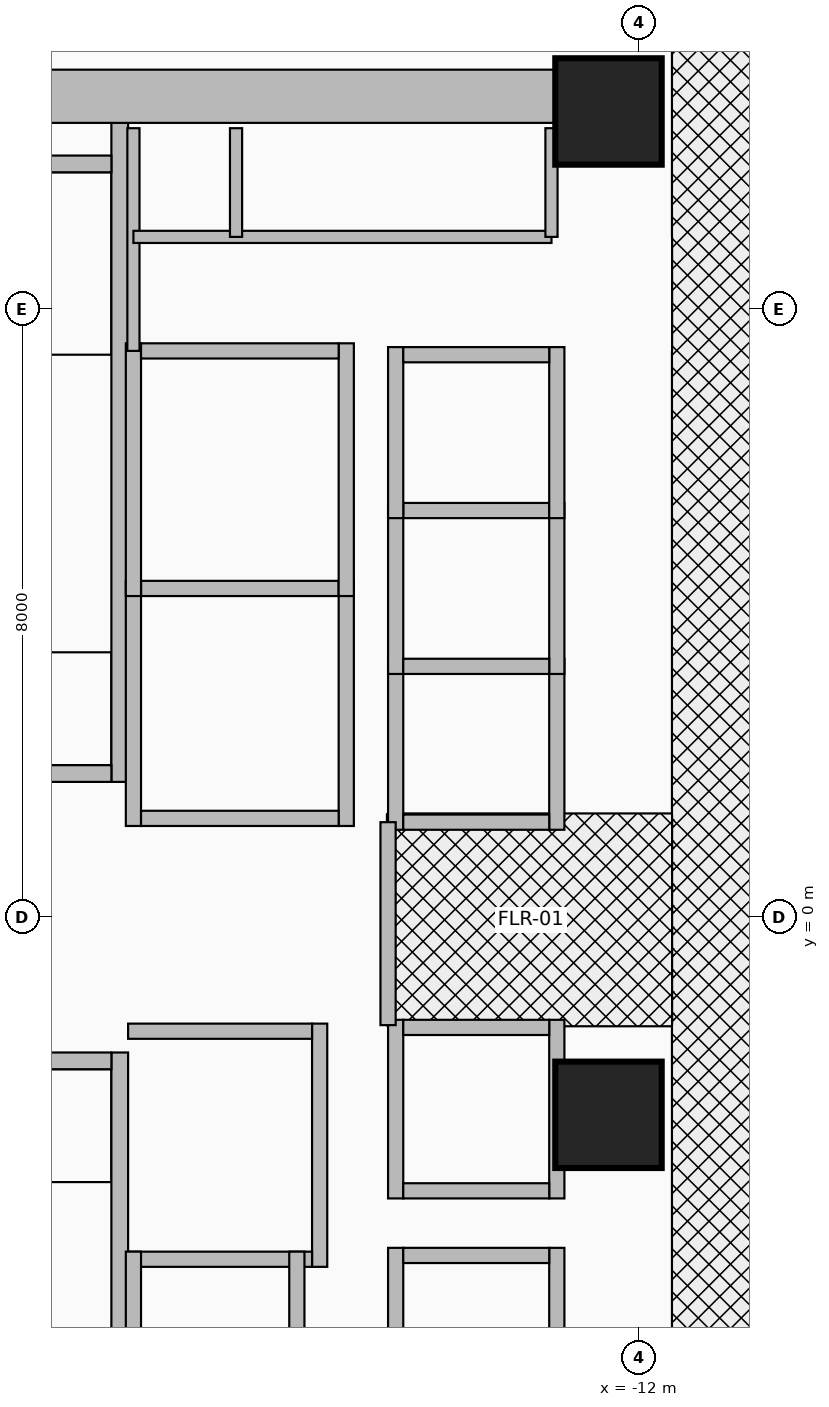
"""IFC4 building model, lengths in metres.
Left out: names, types, materials, properties, quantities, classifications, styles, units other than length and angle.
Written with IfcOpenShell. Run it as: python <this file> out.ifc"""

import sys

from ifc_helpers import new_model, si_unit, direction, frame, frame_2d, origin, origin_2d, place, context, subcontext, project, spatial, rectangle, extrude, source, transform, mapped, element, fill, save


model = new_model("IFC4")
c1 = context("Model", 3, precision=1e-05, world=origin(), true_north=direction((0.0, 1.0)))
c2 = subcontext(c1, "Body", "Model", "MODEL_VIEW")
j1 = project(units=[si_unit("LENGTHUNIT", "METRE"), si_unit("PLANEANGLEUNIT", "RADIAN")], contexts=[c1])
p1 = place(None, origin())
s1 = spatial("IfcSite", under=j1, at=p1, CompositionType="ELEMENT")
p2 = place(p1, origin())
s2 = spatial("IfcBuilding", under=s1, at=p2, CompositionType="ELEMENT")
p3 = place(p2, origin())
s3 = spatial("IfcBuildingStorey", under=s2, at=p3, CompositionType="ELEMENT", Elevation=0.0)
p4 = place(p3, frame((-18.83, 1.78, 0.0), z_axis=(0.0, 0.0, 1.0), x_axis=(0.0, 1.0, 0.0)))
e1 = element("IfcWall", 1, at=p4, inside=s3, PredefinedType="SHEAR", context=c2, shape_type="SweptSolid", body=[
    extrude(rectangle(XDim=8.67, YDim=0.22, at=frame_2d((4.335, 0.0))), origin(), (0.0, 0.0, 1.0), 4.92),
])
p5 = place(p3, frame((-22.05, 1.89, 0.0), z_axis=(0.0, 0.0, 1.0), x_axis=(1.0, 0.0, 0.0)))
e2 = element("IfcWall", 2, at=p5, inside=s3, PredefinedType="SHEAR", context=c2, shape_type="SweptSolid", body=[
    extrude(rectangle(XDim=3.11, YDim=0.22, at=frame_2d((1.555, 0.0))), origin(), (0.0, 0.0, 1.0), 4.92),
])
p6 = place(p5, frame((1.0, 0.0, 0.0)))
e3 = element("IfcOpeningElement", 3, at=p6, cuts=e2, PredefinedType="OPENING", context=c2, shape_type="SweptSolid", body=[
    extrude(rectangle(XDim=1.1, YDim=2.15, at=frame_2d((0.55, 1.075))), frame((0.0, 0.125, 0.0), z_axis=(0.0, -1.0, 0.0), x_axis=(1.0, 0.0, 0.0)), (0.0, 0.0, 1.0), 0.25),
])
p7 = place(p3, frame((-22.05, 9.91, 0.0), z_axis=(0.0, 0.0, 1.0), x_axis=(1.0, 0.0, 0.0)))
e4 = element("IfcWall", 4, at=p7, inside=s3, PredefinedType="SHEAR", context=c2, shape_type="SweptSolid", body=[
    extrude(rectangle(XDim=3.11, YDim=0.22, at=frame_2d((1.555, 0.0))), origin(), (0.0, 0.0, 1.0), 4.92),
])
p8 = place(p3, frame((-18.83, -10.45, 0.0), z_axis=(0.0, 0.0, 1.0), x_axis=(0.0, 1.0, 0.0)))
e5 = element("IfcWall", 5, at=p8, inside=s3, PredefinedType="SHEAR", context=c2, shape_type="SweptSolid", body=[
    extrude(rectangle(XDim=8.67, YDim=0.22, at=frame_2d((4.335, 0.0))), origin(), (0.0, 0.0, 1.0), 4.92),
])
p9 = place(p3, frame((-22.05, -1.89, 0.0), z_axis=(0.0, 0.0, 1.0), x_axis=(1.0, 0.0, 0.0)))
e6 = element("IfcWall", 6, at=p9, inside=s3, PredefinedType="SHEAR", context=c2, shape_type="SweptSolid", body=[
    extrude(rectangle(XDim=3.11, YDim=0.22, at=frame_2d((1.555, 0.0))), origin(), (0.0, 0.0, 1.0), 4.92),
])
p10 = place(p9, frame((1.0, 0.0, 0.0)))
e7 = element("IfcOpeningElement", 7, at=p10, cuts=e6, PredefinedType="OPENING", context=c2, shape_type="SweptSolid", body=[
    extrude(rectangle(XDim=1.1, YDim=2.15, at=frame_2d((0.55, 1.075))), frame((0.0, 0.125, 0.0), z_axis=(0.0, -1.0, 0.0), x_axis=(1.0, 0.0, 0.0)), (0.0, 0.0, 1.0), 0.25),
])
p11 = place(p3, frame((-22.65, 10.8, 0.0), z_axis=(0.0, 0.0, 1.0), x_axis=(1.0, 0.0, 0.0)))
e8 = element("IfcWall", 8, at=p11, inside=s3, PredefinedType="SHEAR", context=c2, shape_type="SweptSolid", body=[
    extrude(rectangle(XDim=10.25, YDim=0.7, at=frame_2d((5.125, 0.0))), origin(), (0.0, 0.0, 1.0), 4.92),
])
m1 = source(origin(), c2, "Body", "SweptSolid", [
    extrude(rectangle(XDim=1.4, YDim=1.4, at=origin_2d()), origin(), (0.0, 0.0, 1.0), 5.2),
])
for number, where, z_axis, x_axis in (
    (9, (-12.4, -2.6, 0.0), (0.0, 0.0, 1.0), (1.0, 0.0, 0.0)),
    (10, (-12.4, 10.6, 0.0), (0.0, 0.0, 1.0), (1.0, 0.0, 0.0)),
):
    element("IfcColumn", number, at=place(p3, frame(where, z_axis=z_axis, x_axis=x_axis)), inside=s3, PredefinedType="COLUMN", context=c2, shape_type="MappedRepresentation", body=[
        mapped(m1, transform((0.0, 0.0, 0.0), x_axis=(1.0, 0.0, 0.0), y_axis=(0.0, 1.0, 0.0), z_axis=(0.0, 0.0, 1.0), scale=1.0)),
    ])
for number, where, z_axis, x_axis in (
    (11, (-18.65, 1.2, 0.0), (0.0, 0.0, 1.0), (0.0, 1.0, 0.0)),
    (12, (-15.85, 1.2, 0.0), (0.0, 0.0, 1.0), (0.0, 1.0, 0.0)),
):
    element("IfcWall", number, at=place(p3, frame(where, z_axis=z_axis, x_axis=x_axis)), inside=s3, PredefinedType="MOVABLE", context=c2, shape_type="SweptSolid", body=[
        extrude(rectangle(XDim=3.225, YDim=0.2, at=frame_2d((1.613, 0.0))), origin(), (0.0, 0.0, 1.0), 4.92),
    ])
p12 = place(p3, frame((-18.55, 1.3, 0.0), z_axis=(0.0, 0.0, 1.0), x_axis=(1.0, 0.0, 0.0)))
e13 = element("IfcWall", 13, at=p12, inside=s3, PredefinedType="MOVABLE", context=c2, shape_type="SweptSolid", body=[
    extrude(rectangle(XDim=2.6, YDim=0.2, at=frame_2d((1.3, 0.0))), origin(), (0.0, 0.0, 1.0), 4.92),
])
p13 = place(p12, frame((0.7, 0.0, 0.0)))
e14 = element("IfcOpeningElement", 14, at=p13, cuts=e13, PredefinedType="OPENING", context=c2, shape_type="SweptSolid", body=[
    extrude(rectangle(XDim=1.2, YDim=2.1, at=frame_2d((0.6, 1.05))), frame((0.0, 0.115, 0.0), z_axis=(0.0, -1.0, 0.0), x_axis=(1.0, 0.0, 0.0)), (0.0, 0.0, 1.0), 0.23),
])
p14 = place(p3, frame((-18.55, 4.325, 0.0), z_axis=(0.0, 0.0, 1.0), x_axis=(1.0, 0.0, 0.0)))
e15 = element("IfcWall", 15, at=p14, inside=s3, PredefinedType="MOVABLE", context=c2, shape_type="SweptSolid", body=[
    extrude(rectangle(XDim=2.6, YDim=0.2, at=frame_2d((1.3, 0.0))), origin(), (0.0, 0.0, 1.0), 4.92),
])
p15 = place(p3, frame((-16.2, -4.6, 0.0), z_axis=(0.0, 0.0, 1.0), x_axis=(0.0, 1.0, 0.0)))
e16 = element("IfcWall", 16, at=p15, inside=s3, PredefinedType="MOVABLE", context=c2, shape_type="SweptSolid", body=[
    extrude(rectangle(XDim=3.2, YDim=0.2, at=frame_2d((1.6, 0.0))), origin(), (0.0, 0.0, 1.0), 4.92),
])
p16 = place(p3, frame((-18.72, -4.5, 0.0), z_axis=(0.0, 0.0, 1.0), x_axis=(1.0, 0.0, 0.0)))
e17 = element("IfcWall", 17, at=p16, inside=s3, PredefinedType="MOVABLE", context=c2, shape_type="SweptSolid", body=[
    extrude(rectangle(XDim=2.42, YDim=0.2, at=frame_2d((1.21, 0.0))), origin(), (0.0, 0.0, 1.0), 4.92),
])
p17 = place(p3, frame((-18.72, -1.5, 0.0), z_axis=(0.0, 0.0, 1.0), x_axis=(1.0, 0.0, 0.0)))
e18 = element("IfcWall", 18, at=p17, inside=s3, PredefinedType="MOVABLE", context=c2, shape_type="SweptSolid", body=[
    extrude(rectangle(XDim=2.42, YDim=0.2, at=frame_2d((1.21, 0.0))), origin(), (0.0, 0.0, 1.0), 4.92),
])
p18 = place(p17, frame((0.61, 0.0, 0.0)))
e19 = element("IfcOpeningElement", 19, at=p18, cuts=e18, PredefinedType="OPENING", context=c2, shape_type="SweptSolid", body=[
    extrude(rectangle(XDim=1.2, YDim=2.1, at=frame_2d((0.6, 1.05))), frame((0.0, 0.115, 0.0), z_axis=(0.0, -1.0, 0.0), x_axis=(1.0, 0.0, 0.0)), (0.0, 0.0, 1.0), 0.23),
])
for number, where, z_axis, x_axis in (
    (20, (-18.65, 4.225, 0.0), (0.0, 0.0, 1.0), (0.0, 1.0, 0.0)),
    (21, (-15.85, 4.225, 0.0), (0.0, 0.0, 1.0), (0.0, 1.0, 0.0)),
):
    element("IfcWall", number, at=place(p3, frame(where, z_axis=z_axis, x_axis=x_axis)), inside=s3, PredefinedType="MOVABLE", context=c2, shape_type="SweptSolid", body=[
        extrude(rectangle(XDim=3.325, YDim=0.2, at=frame_2d((1.663, 0.0))), origin(), (0.0, 0.0, 1.0), 4.92),
    ])
p19 = place(p3, frame((-18.55, 7.45, 0.0), z_axis=(0.0, 0.0, 1.0), x_axis=(1.0, 0.0, 0.0)))
e22 = element("IfcWall", 22, at=p19, inside=s3, PredefinedType="MOVABLE", context=c2, shape_type="SweptSolid", body=[
    extrude(rectangle(XDim=2.6, YDim=0.2, at=frame_2d((1.3, 0.0))), origin(), (0.0, 0.0, 1.0), 4.92),
])
p20 = place(p19, frame((0.7, 0.0, 0.0)))
e23 = element("IfcOpeningElement", 23, at=p20, cuts=e22, PredefinedType="OPENING", context=c2, shape_type="SweptSolid", body=[
    extrude(rectangle(XDim=1.2, YDim=2.1, at=frame_2d((0.6, 1.05))), frame((0.0, 0.115, 0.0), z_axis=(0.0, -1.0, 0.0), x_axis=(1.0, 0.0, 0.0)), (0.0, 0.0, 1.0), 0.23),
])
for number, where, z_axis, x_axis in (
    (24, (-15.2, -6.7, 0.0), (0.0, 0.0, 1.0), (0.0, 1.0, 0.0)),
    (25, (-13.08, -6.7, 0.0), (0.0, 0.0, 1.0), (0.0, 1.0, 0.0)),
):
    element("IfcWall", number, at=place(p3, frame(where, z_axis=z_axis, x_axis=x_axis)), inside=s3, PredefinedType="MOVABLE", context=c2, shape_type="SweptSolid", body=[
        extrude(rectangle(XDim=2.35, YDim=0.2, at=frame_2d((1.175, 0.0))), origin(), (0.0, 0.0, 1.0), 4.92),
    ])
p21 = place(p3, frame((-15.1, -4.45, 0.0), z_axis=(0.0, 0.0, 1.0), x_axis=(1.0, 0.0, 0.0)))
e26 = element("IfcWall", 26, at=p21, inside=s3, PredefinedType="MOVABLE", context=c2, shape_type="SweptSolid", body=[
    extrude(rectangle(XDim=1.92, YDim=0.2, at=frame_2d((0.96, 0.0))), origin(), (0.0, 0.0, 1.0), 4.92),
])
p22 = place(p3, frame((-15.2, 1.15, 0.0), z_axis=(0.0, 0.0, 1.0), x_axis=(0.0, 1.0, 0.0)))
e27 = element("IfcWall", 27, at=p22, inside=s3, PredefinedType="MOVABLE", context=c2, shape_type="SweptSolid", body=[
    extrude(rectangle(XDim=2.25, YDim=0.2, at=frame_2d((1.125, 0.0))), origin(), (0.0, 0.0, 1.0), 4.92),
])
p23 = place(p3, frame((-13.08, 1.15, 0.0), z_axis=(0.0, 0.0, 1.0), x_axis=(0.0, 1.0, 0.0)))
e28 = element("IfcWall", 28, at=p23, inside=s3, PredefinedType="MOVABLE", context=c2, shape_type="SweptSolid", body=[
    extrude(rectangle(XDim=2.25, YDim=0.2, at=frame_2d((1.125, 0.0))), origin(), (0.0, 0.0, 1.0), 4.92),
])
p24 = place(p23, frame((0.575, 0.0, 0.0)))
e29 = element("IfcOpeningElement", 29, at=p24, cuts=e28, PredefinedType="OPENING", context=c2, shape_type="SweptSolid", body=[
    extrude(rectangle(XDim=1.1, YDim=2.1, at=frame_2d((0.55, 1.05))), frame((0.0, 0.115, 0.0), z_axis=(0.0, -1.0, 0.0), x_axis=(1.0, 0.0, 0.0)), (0.0, 0.0, 1.0), 0.23),
])
p25 = place(p3, frame((-15.1, 1.25, 0.0), z_axis=(0.0, 0.0, 1.0), x_axis=(1.0, 0.0, 0.0)))
e30 = element("IfcWall", 30, at=p25, inside=s3, PredefinedType="MOVABLE", context=c2, shape_type="SweptSolid", body=[
    extrude(rectangle(XDim=1.92, YDim=0.2, at=frame_2d((0.96, 0.0))), origin(), (0.0, 0.0, 1.0), 4.92),
])
p26 = place(p3, frame((-15.2, 3.2, 0.0), z_axis=(0.0, 0.0, 1.0), x_axis=(0.0, 1.0, 0.0)))
e31 = element("IfcWall", 31, at=p26, inside=s3, PredefinedType="MOVABLE", context=c2, shape_type="SweptSolid", body=[
    extrude(rectangle(XDim=2.25, YDim=0.2, at=frame_2d((1.125, 0.0))), origin(), (0.0, 0.0, 1.0), 4.92),
])
p27 = place(p3, frame((-13.08, 3.2, 0.0), z_axis=(0.0, 0.0, 1.0), x_axis=(0.0, 1.0, 0.0)))
e32 = element("IfcWall", 32, at=p27, inside=s3, PredefinedType="MOVABLE", context=c2, shape_type="SweptSolid", body=[
    extrude(rectangle(XDim=2.25, YDim=0.2, at=frame_2d((1.125, 0.0))), origin(), (0.0, 0.0, 1.0), 4.92),
])
p28 = place(p27, frame((0.575, 0.0, 0.0)))
e33 = element("IfcOpeningElement", 33, at=p28, cuts=e32, PredefinedType="OPENING", context=c2, shape_type="SweptSolid", body=[
    extrude(rectangle(XDim=1.1, YDim=2.1, at=frame_2d((0.55, 1.05))), frame((0.0, 0.115, 0.0), z_axis=(0.0, -1.0, 0.0), x_axis=(1.0, 0.0, 0.0)), (0.0, 0.0, 1.0), 0.23),
])
for number, where, z_axis, x_axis in (
    (34, (-15.1, 3.3, 0.0), (0.0, 0.0, 1.0), (1.0, 0.0, 0.0)),
    (35, (-15.1, 5.35, 0.0), (0.0, 0.0, 1.0), (1.0, 0.0, 0.0)),
):
    element("IfcWall", number, at=place(p3, frame(where, z_axis=z_axis, x_axis=x_axis)), inside=s3, PredefinedType="MOVABLE", context=c2, shape_type="SweptSolid", body=[
        extrude(rectangle(XDim=1.92, YDim=0.2, at=frame_2d((0.96, 0.0))), origin(), (0.0, 0.0, 1.0), 4.92),
    ])
p29 = place(p3, frame((-15.2, 5.25, 0.0), z_axis=(0.0, 0.0, 1.0), x_axis=(0.0, 1.0, 0.0)))
e36 = element("IfcWall", 36, at=p29, inside=s3, PredefinedType="MOVABLE", context=c2, shape_type="SweptSolid", body=[
    extrude(rectangle(XDim=2.25, YDim=0.2, at=frame_2d((1.125, 0.0))), origin(), (0.0, 0.0, 1.0), 4.92),
])
p30 = place(p3, frame((-13.08, 5.25, 0.0), z_axis=(0.0, 0.0, 1.0), x_axis=(0.0, 1.0, 0.0)))
e37 = element("IfcWall", 37, at=p30, inside=s3, PredefinedType="MOVABLE", context=c2, shape_type="SweptSolid", body=[
    extrude(rectangle(XDim=2.25, YDim=0.2, at=frame_2d((1.125, 0.0))), origin(), (0.0, 0.0, 1.0), 4.92),
])
p31 = place(p30, frame((0.575, 0.0, 0.0)))
e38 = element("IfcOpeningElement", 38, at=p31, cuts=e37, PredefinedType="OPENING", context=c2, shape_type="SweptSolid", body=[
    extrude(rectangle(XDim=1.1, YDim=2.1, at=frame_2d((0.55, 1.05))), frame((0.0, 0.115, 0.0), z_axis=(0.0, -1.0, 0.0), x_axis=(1.0, 0.0, 0.0)), (0.0, 0.0, 1.0), 0.23),
])
p32 = place(p3, frame((-15.1, 7.4, 0.0), z_axis=(0.0, 0.0, 1.0), x_axis=(1.0, 0.0, 0.0)))
e39 = element("IfcWall", 39, at=p32, inside=s3, PredefinedType="MOVABLE", context=c2, shape_type="SweptSolid", body=[
    extrude(rectangle(XDim=1.92, YDim=0.2, at=frame_2d((0.96, 0.0))), origin(), (0.0, 0.0, 1.0), 4.92),
])
for number, where, z_axis, x_axis in (
    (40, (-18.65, -6.7, 0.0), (0.0, 0.0, 1.0), (0.0, 1.0, 0.0)),
    (41, (-16.5, -6.7, 0.0), (0.0, 0.0, 1.0), (0.0, 1.0, 0.0)),
):
    element("IfcWall", number, at=place(p3, frame(where, z_axis=z_axis, x_axis=x_axis)), inside=s3, PredefinedType="MOVABLE", context=c2, shape_type="SweptSolid", body=[
        extrude(rectangle(XDim=2.3, YDim=0.2, at=frame_2d((1.15, 0.0))), origin(), (0.0, 0.0, 1.0), 4.92),
    ])
for number, where, z_axis, x_axis in (
    (42, (-15.2, -3.7, 0.0), (0.0, 0.0, 1.0), (0.0, 1.0, 0.0)),
    (43, (-13.08, -3.7, 0.0), (0.0, 0.0, 1.0), (0.0, 1.0, 0.0)),
):
    element("IfcWall", number, at=place(p3, frame(where, z_axis=z_axis, x_axis=x_axis)), inside=s3, PredefinedType="MOVABLE", context=c2, shape_type="SweptSolid", body=[
        extrude(rectangle(XDim=2.35, YDim=0.2, at=frame_2d((1.175, 0.0))), origin(), (0.0, 0.0, 1.0), 4.92),
    ])
p33 = place(p3, frame((-15.1, -3.6, 0.0), z_axis=(0.0, 0.0, 1.0), x_axis=(1.0, 0.0, 0.0)))
e44 = element("IfcWall", 44, at=p33, inside=s3, PredefinedType="MOVABLE", context=c2, shape_type="SweptSolid", body=[
    extrude(rectangle(XDim=1.92, YDim=0.2, at=frame_2d((0.96, 0.0))), origin(), (0.0, 0.0, 1.0), 4.92),
])
p34 = place(p3, frame((-15.1, -1.45, 0.0), z_axis=(0.0, 0.0, 1.0), x_axis=(1.0, 0.0, 0.0)))
e45 = element("IfcWall", 45, at=p34, inside=s3, PredefinedType="MOVABLE", context=c2, shape_type="SweptSolid", body=[
    extrude(rectangle(XDim=1.92, YDim=0.2, at=frame_2d((0.96, 0.0))), origin(), (0.0, 0.0, 1.0), 4.92),
])
p35 = place(p34, frame((0.41, 0.0, 0.0)))
e46 = element("IfcOpeningElement", 46, at=p35, cuts=e45, PredefinedType="OPENING", context=c2, shape_type="SweptSolid", body=[
    extrude(rectangle(XDim=1.1, YDim=2.1, at=frame_2d((0.55, 1.05))), frame((0.0, 0.115, 0.0), z_axis=(0.0, -1.0, 0.0), x_axis=(1.0, 0.0, 0.0)), (0.0, 0.0, 1.0), 0.23),
])
p36 = place(p3, frame((-15.3, -1.42, 0.0), z_axis=(0.0, 0.0, 1.0), x_axis=(0.0, 1.0, 0.0)))
e47 = element("IfcWall", 47, at=p36, inside=s3, PredefinedType="PARTITIONING", context=c2, shape_type="SweptSolid", body=[
    extrude(rectangle(XDim=2.67, YDim=0.2, at=frame_2d((1.335, 0.0))), origin(), (0.0, 0.0, 1.0), 4.92),
])
p37 = place(p36, frame((0.78, 0.0, 0.0)))
e48 = element("IfcOpeningElement", 48, at=p37, cuts=e47, PredefinedType="OPENING", context=c2, shape_type="SweptSolid", body=[
    extrude(rectangle(XDim=1.05, YDim=2.15, at=frame_2d((0.525, 1.075))), frame((0.0, 0.115, 0.0), z_axis=(0.0, -1.0, 0.0), x_axis=(1.0, 0.0, 0.0)), (0.0, 0.0, 1.0), 0.23),
])
p38 = place(p3, frame((-18.65, 7.45, 0.0), z_axis=(0.0, 0.0, 1.0), x_axis=(0.0, 1.0, 0.0)))
e49 = element("IfcWall", 49, at=p38, inside=s3, PredefinedType="PARTITIONING", context=c2, shape_type="SweptSolid", body=[
    extrude(rectangle(XDim=2.93, YDim=0.16, at=frame_2d((1.465, 0.0))), origin(), (0.0, 0.0, 1.0), 3.957),
])
p39 = place(p3, frame((-18.65, 8.95, 0.0), z_axis=(0.0, 0.0, 1.0), x_axis=(1.0, 0.0, 0.0)))
e50 = element("IfcWall", 50, at=p39, inside=s3, PredefinedType="PARTITIONING", context=c2, shape_type="SweptSolid", body=[
    extrude(rectangle(XDim=5.5, YDim=0.16, at=frame_2d((2.75, 0.0))), origin(), (0.0, 0.0, 1.0), 4.92),
])
p40 = place(p39, frame((0.3, 0.0, 0.0)))
e51 = element("IfcOpeningElement", 51, at=p40, cuts=e50, PredefinedType="OPENING", context=c2, shape_type="SweptSolid", body=[
    extrude(rectangle(XDim=0.85, YDim=2.05, at=frame_2d((0.425, 1.025))), frame((0.0, 0.095, 0.0), z_axis=(0.0, -1.0, 0.0), x_axis=(1.0, 0.0, 0.0)), (0.0, 0.0, 1.0), 0.19),
])
p41 = place(p39, frame((2.5, 0.0, 0.0)))
e52 = element("IfcOpeningElement", 52, at=p41, cuts=e50, PredefinedType="OPENING", context=c2, shape_type="SweptSolid", body=[
    extrude(rectangle(XDim=0.95, YDim=2.15, at=frame_2d((0.475, 1.075))), frame((0.0, 0.095, 0.0), z_axis=(0.0, -1.0, 0.0), x_axis=(1.0, 0.0, 0.0)), (0.0, 0.0, 1.0), 0.19),
])
for number, where, z_axis, x_axis in (
    (53, (-13.15, 8.95, 0.0), (0.0, 0.0, 1.0), (0.0, 1.0, 0.0)),
    (54, (-17.3, 8.95, 0.0), (0.0, 0.0, 1.0), (0.0, 1.0, 0.0)),
):
    element("IfcWall", number, at=place(p3, frame(where, z_axis=z_axis, x_axis=x_axis)), inside=s3, PredefinedType="PARTITIONING", context=c2, shape_type="SweptSolid", body=[
        extrude(rectangle(XDim=1.43, YDim=0.16, at=frame_2d((0.715, 0.0))), origin(), (0.0, 0.0, 1.0), 3.957),
    ])
p42 = place(p13, origin())
e55 = element("IfcDoor", 55, at=p42, inside=s3, OperationType="DOUBLE_DOOR_SLIDING", PredefinedType="DOOR", context=c2, shape_type="SweptSolid", body=[
    extrude(rectangle(XDim=1.2, YDim=2.1, at=frame_2d((0.6, 1.05))), frame((0.0, 0.025, 0.0), z_axis=(0.0, -1.0, 0.0), x_axis=(1.0, 0.0, 0.0)), (0.0, 0.0, 1.0), 0.05),
])
fill(e14, e55)
p43 = place(p18, origin())
e56 = element("IfcDoor", 56, at=p43, inside=s3, OperationType="DOUBLE_DOOR_SLIDING", PredefinedType="DOOR", context=c2, shape_type="SweptSolid", body=[
    extrude(rectangle(XDim=1.2, YDim=2.1, at=frame_2d((0.6, 1.05))), frame((0.0, 0.025, 0.0), z_axis=(0.0, -1.0, 0.0), x_axis=(1.0, 0.0, 0.0)), (0.0, 0.0, 1.0), 0.05),
])
fill(e19, e56)
p44 = place(p20, origin())
e57 = element("IfcDoor", 57, at=p44, inside=s3, OperationType="DOUBLE_DOOR_SLIDING", PredefinedType="DOOR", context=c2, shape_type="SweptSolid", body=[
    extrude(rectangle(XDim=1.2, YDim=2.1, at=frame_2d((0.6, 1.05))), frame((0.0, 0.025, 0.0), z_axis=(0.0, -1.0, 0.0), x_axis=(1.0, 0.0, 0.0)), (0.0, 0.0, 1.0), 0.05),
])
fill(e23, e57)
p45 = place(p24, origin())
e58 = element("IfcDoor", 58, at=p45, inside=s3, OperationType="DOUBLE_DOOR_SLIDING", PredefinedType="DOOR", context=c2, shape_type="SweptSolid", body=[
    extrude(rectangle(XDim=1.1, YDim=2.1, at=frame_2d((0.55, 1.05))), frame((0.0, 0.025, 0.0), z_axis=(0.0, -1.0, 0.0), x_axis=(1.0, 0.0, 0.0)), (0.0, 0.0, 1.0), 0.05),
])
fill(e29, e58)
p46 = place(p28, origin())
e59 = element("IfcDoor", 59, at=p46, inside=s3, OperationType="DOUBLE_DOOR_SLIDING", PredefinedType="DOOR", context=c2, shape_type="SweptSolid", body=[
    extrude(rectangle(XDim=1.1, YDim=2.1, at=frame_2d((0.55, 1.05))), frame((0.0, 0.025, 0.0), z_axis=(0.0, -1.0, 0.0), x_axis=(1.0, 0.0, 0.0)), (0.0, 0.0, 1.0), 0.05),
])
fill(e33, e59)
p47 = place(p31, origin())
e60 = element("IfcDoor", 60, at=p47, inside=s3, OperationType="DOUBLE_DOOR_SLIDING", PredefinedType="DOOR", context=c2, shape_type="SweptSolid", body=[
    extrude(rectangle(XDim=1.1, YDim=2.1, at=frame_2d((0.55, 1.05))), frame((0.0, 0.025, 0.0), z_axis=(0.0, -1.0, 0.0), x_axis=(1.0, 0.0, 0.0)), (0.0, 0.0, 1.0), 0.05),
])
fill(e38, e60)
p48 = place(p35, origin())
e61 = element("IfcDoor", 61, at=p48, inside=s3, OperationType="DOUBLE_DOOR_SLIDING", PredefinedType="DOOR", context=c2, shape_type="SweptSolid", body=[
    extrude(rectangle(XDim=1.1, YDim=2.1, at=frame_2d((0.55, 1.05))), frame((0.0, 0.025, 0.0), z_axis=(0.0, -1.0, 0.0), x_axis=(1.0, 0.0, 0.0)), (0.0, 0.0, 1.0), 0.05),
])
fill(e46, e61)
p49 = place(p37, origin())
e62 = element("IfcDoor", 62, at=p49, inside=s3, OperationType="SINGLE_SWING_RIGHT", PredefinedType="DOOR", context=c2, shape_type="SweptSolid", body=[
    extrude(rectangle(XDim=1.05, YDim=2.15, at=frame_2d((0.525, 1.075))), frame((0.0, 0.025, 0.0), z_axis=(0.0, -1.0, 0.0), x_axis=(1.0, 0.0, 0.0)), (0.0, 0.0, 1.0), 0.05),
])
fill(e48, e62)
p50 = place(p40, origin())
e63 = element("IfcDoor", 63, at=p50, inside=s3, OperationType="SINGLE_SWING_RIGHT", PredefinedType="DOOR", context=c2, shape_type="SweptSolid", body=[
    extrude(rectangle(XDim=0.85, YDim=2.05, at=frame_2d((0.425, 1.025))), frame((0.0, 0.025, 0.0), z_axis=(0.0, -1.0, 0.0), x_axis=(1.0, 0.0, 0.0)), (0.0, 0.0, 1.0), 0.05),
])
fill(e51, e63)
p51 = place(p41, origin())
e64 = element("IfcDoor", 64, at=p51, inside=s3, OperationType="SINGLE_SWING_LEFT", PredefinedType="DOOR", context=c2, shape_type="SweptSolid", body=[
    extrude(rectangle(XDim=0.95, YDim=2.15, at=frame_2d((0.475, 1.075))), frame((0.0, 0.025, 0.0), z_axis=(0.0, -1.0, 0.0), x_axis=(1.0, 0.0, 0.0)), (0.0, 0.0, 1.0), 0.05),
])
fill(e52, e64)
save(model, sys.argv[1])
